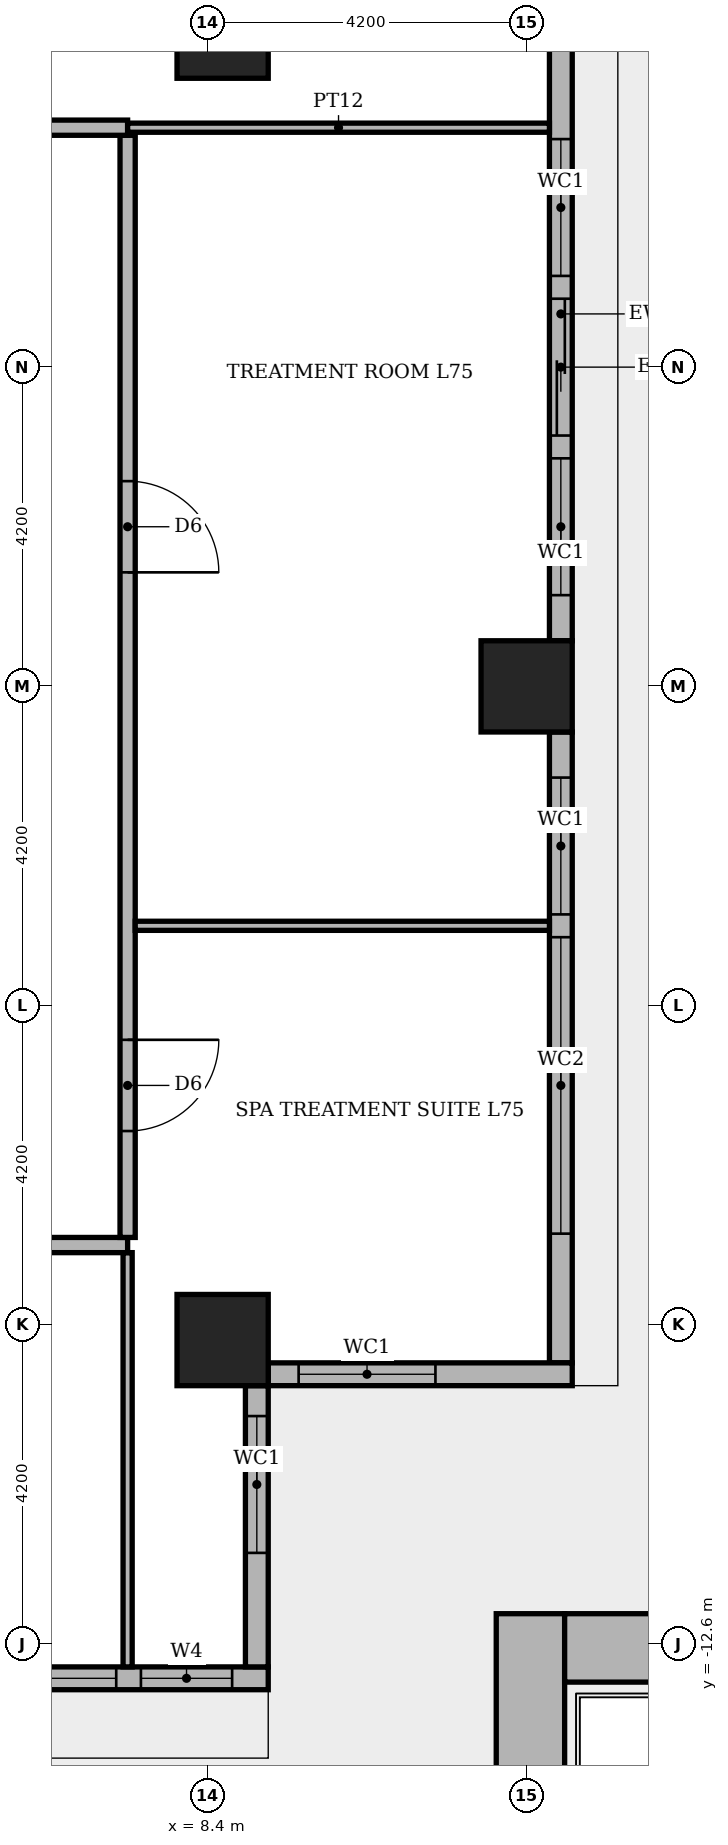
"""IFC4 building model, lengths in metres.
Left out: names, types, materials, properties, quantities, classifications, styles, units other than length and angle.
Written with IfcOpenShell. Run it as: python <this file> out.ifc"""

import sys

from ifc_helpers import new_model, si_unit, direction, frame, frame_2d, origin, origin_2d, place, context, subcontext, project, spatial, rectangle, extrude, element, fill, save


model = new_model("IFC4")
c1 = context("Model", 3, precision=1e-05, world=origin(), true_north=direction((0.0, 1.0)))
c2 = subcontext(c1, "Body", "Model", "MODEL_VIEW")
j1 = project(units=[si_unit("LENGTHUNIT", "METRE"), si_unit("PLANEANGLEUNIT", "RADIAN")], contexts=[c1])
p1 = place(None, origin())
s1 = spatial("IfcSite", under=j1, at=p1, CompositionType="ELEMENT")
p2 = place(p1, origin())
s2 = spatial("IfcBuilding", under=s1, at=p2, CompositionType="ELEMENT")
p3 = place(p2, frame((0.0, 0.0, 312.3)))
s3 = spatial("IfcBuildingStorey", under=s2, at=p3, CompositionType="ELEMENT", Elevation=312.3)
for number, where, z_axis, x_axis in (
    (1, (12.6, 0.0, -0.35), (0.0, 0.0, 1.0), (1.0, 0.0, 0.0)),
    (2, (8.6, 8.6, -0.35), (0.0, 0.0, 1.0), (1.0, 0.0, 0.0)),
    (3, (8.6, -8.6, -0.35), (0.0, 0.0, 1.0), (1.0, 0.0, 0.0)),
):
    element("IfcColumn", number, at=place(p3, frame(where, z_axis=z_axis, x_axis=x_axis)), inside=s3, PredefinedType="COLUMN", context=c2, shape_type="SweptSolid", body=[
        extrude(rectangle(XDim=1.2, YDim=1.2, at=origin_2d()), origin(), (0.0, 0.0, 1.0), 4.25),
    ])
p4 = place(p3, frame((13.05, -8.9, 0.0), z_axis=(0.0, 0.0, 1.0), x_axis=(0.0, 1.0, 0.0)))
e4 = element("IfcWall", 4, at=p4, inside=s3, PredefinedType="STANDARD", context=c2, shape_type="SweptSolid", body=[
    extrude(rectangle(XDim=8.3, YDim=0.3, at=frame_2d((4.15, 0.0))), origin(), (0.0, 0.0, 1.0), 3.55),
])
p5 = place(p4, frame((1.7, 0.0, 0.6)))
e5 = element("IfcOpeningElement", 5, at=p5, cuts=e4, PredefinedType="OPENING", context=c2, shape_type="SweptSolid", body=[
    extrude(rectangle(XDim=3.9, YDim=2.4, at=frame_2d((1.95, 1.2))), frame((0.0, 0.16, 0.0), z_axis=(0.0, -1.0, 0.0), x_axis=(1.0, 0.0, 0.0)), (0.0, 0.0, 1.0), 0.32),
])
p6 = place(p4, frame((5.9, 0.0, 0.6)))
e6 = element("IfcOpeningElement", 6, at=p6, cuts=e4, PredefinedType="OPENING", context=c2, shape_type="SweptSolid", body=[
    extrude(rectangle(XDim=1.8, YDim=2.4, at=frame_2d((0.9, 1.2))), frame((0.0, 0.16, 0.0), z_axis=(0.0, -1.0, 0.0), x_axis=(1.0, 0.0, 0.0)), (0.0, 0.0, 1.0), 0.32),
])
p7 = place(p3, frame((13.05, 0.6, 0.0), z_axis=(0.0, 0.0, 1.0), x_axis=(0.0, 1.0, 0.0)))
e7 = element("IfcWall", 7, at=p7, inside=s3, PredefinedType="STANDARD", context=c2, shape_type="SweptSolid", body=[
    extrude(rectangle(XDim=8.6, YDim=0.3, at=frame_2d((4.3, 0.0))), origin(), (0.0, 0.0, 1.0), 3.55),
])
p8 = place(p7, frame((0.6, 0.0, 0.6)))
e8 = element("IfcOpeningElement", 8, at=p8, cuts=e7, PredefinedType="OPENING", context=c2, shape_type="SweptSolid", body=[
    extrude(rectangle(XDim=1.8, YDim=2.4, at=frame_2d((0.9, 1.2))), frame((0.0, 0.16, 0.0), z_axis=(0.0, -1.0, 0.0), x_axis=(1.0, 0.0, 0.0)), (0.0, 0.0, 1.0), 0.32),
])
p9 = place(p7, frame((2.7, 0.0, 0.0)))
e9 = element("IfcOpeningElement", 9, at=p9, cuts=e7, PredefinedType="OPENING", context=c2, shape_type="SweptSolid", body=[
    extrude(rectangle(XDim=1.8, YDim=2.4, at=frame_2d((0.9, 1.2))), frame((0.0, 0.16, 0.0), z_axis=(0.0, -1.0, 0.0), x_axis=(1.0, 0.0, 0.0)), (0.0, 0.0, 1.0), 0.32),
])
p10 = place(p7, frame((4.8, 0.0, 0.6)))
e10 = element("IfcOpeningElement", 10, at=p10, cuts=e7, PredefinedType="OPENING", context=c2, shape_type="SweptSolid", body=[
    extrude(rectangle(XDim=1.8, YDim=2.4, at=frame_2d((0.9, 1.2))), frame((0.0, 0.16, 0.0), z_axis=(0.0, -1.0, 0.0), x_axis=(1.0, 0.0, 0.0)), (0.0, 0.0, 1.0), 0.32),
])
p11 = place(p3, frame((0.6, -13.05, 0.0), z_axis=(0.0, 0.0, 1.0), x_axis=(1.0, 0.0, 0.0)))
e11 = element("IfcWall", 11, at=p11, inside=s3, PredefinedType="STANDARD", context=c2, shape_type="SweptSolid", body=[
    extrude(rectangle(XDim=8.6, YDim=0.3, at=frame_2d((4.3, 0.0))), origin(), (0.0, 0.0, 1.0), 3.55),
])
p12 = place(p11, frame((0.6, 0.0, 0.6)))
e12 = element("IfcOpeningElement", 12, at=p12, cuts=e11, PredefinedType="OPENING", context=c2, shape_type="SweptSolid", body=[
    extrude(rectangle(XDim=6.0, YDim=2.4, at=frame_2d((3.0, 1.2))), frame((0.0, 0.16, 0.0), z_axis=(0.0, -1.0, 0.0), x_axis=(1.0, 0.0, 0.0)), (0.0, 0.0, 1.0), 0.32),
])
p13 = place(p11, frame((6.925, 0.0, 0.9)))
e13 = element("IfcOpeningElement", 13, at=p13, cuts=e11, PredefinedType="OPENING", context=c2, shape_type="SweptSolid", body=[
    extrude(rectangle(XDim=1.2, YDim=2.1, at=frame_2d((0.6, 1.05))), frame((0.0, 0.16, 0.0), z_axis=(0.0, -1.0, 0.0), x_axis=(1.0, 0.0, 0.0)), (0.0, 0.0, 1.0), 0.32),
])
p14 = place(p3, frame((9.05, -12.9, 0.0), z_axis=(0.0, 0.0, 1.0), x_axis=(0.0, 1.0, 0.0)))
e14 = element("IfcWall", 14, at=p14, inside=s3, PredefinedType="STANDARD", context=c2, shape_type="SweptSolid", body=[
    extrude(rectangle(XDim=3.7, YDim=0.3, at=frame_2d((1.85, 0.0))), origin(), (0.0, 0.0, 1.0), 3.55),
])
p15 = place(p14, frame((1.5, 0.0, 0.6)))
e15 = element("IfcOpeningElement", 15, at=p15, cuts=e14, PredefinedType="OPENING", context=c2, shape_type="SweptSolid", body=[
    extrude(rectangle(XDim=1.8, YDim=2.4, at=frame_2d((0.9, 1.2))), frame((0.0, 0.16, 0.0), z_axis=(0.0, -1.0, 0.0), x_axis=(1.0, 0.0, 0.0)), (0.0, 0.0, 1.0), 0.32),
])
p16 = place(p3, frame((9.2, -9.05, 0.0), z_axis=(0.0, 0.0, 1.0), x_axis=(1.0, 0.0, 0.0)))
e16 = element("IfcWall", 16, at=p16, inside=s3, PredefinedType="STANDARD", context=c2, shape_type="SweptSolid", body=[
    extrude(rectangle(XDim=4.0, YDim=0.3, at=frame_2d((2.0, 0.0))), origin(), (0.0, 0.0, 1.0), 3.55),
])
p17 = place(p16, frame((0.4, 0.0, 0.6)))
e17 = element("IfcOpeningElement", 17, at=p17, cuts=e16, PredefinedType="OPENING", context=c2, shape_type="SweptSolid", body=[
    extrude(rectangle(XDim=1.8, YDim=2.4, at=frame_2d((0.9, 1.2))), frame((0.0, 0.16, 0.0), z_axis=(0.0, -1.0, 0.0), x_axis=(1.0, 0.0, 0.0)), (0.0, 0.0, 1.0), 0.32),
])
p18 = place(p3, frame((12.65, -18.6, 0.0), z_axis=(0.0, 0.0, 1.0), x_axis=(0.0, 1.0, 0.0)))
e18 = element("IfcWall", 18, at=p18, inside=s3, PredefinedType="MOVABLE", context=c2, shape_type="SweptSolid", body=[
    extrude(rectangle(XDim=6.4, YDim=0.9, at=frame_2d((3.2, 0.0))), origin(), (0.0, 0.0, 1.0), 0.6),
])
p19 = place(p3, frame((13.1, -12.65, 0.0), z_axis=(0.0, 0.0, 1.0), x_axis=(1.0, 0.0, 0.0)))
e19 = element("IfcWall", 19, at=p19, inside=s3, PredefinedType="MOVABLE", context=c2, shape_type="SweptSolid", body=[
    extrude(rectangle(XDim=4.6, YDim=0.9, at=frame_2d((2.3, 0.0))), origin(), (0.0, 0.0, 1.0), 0.6),
])
p20 = place(p3, frame((7.35, -12.9, 0.0), z_axis=(0.0, 0.0, 1.0), x_axis=(0.0, 1.0, 0.0)))
e20 = element("IfcWall", 20, at=p20, inside=s3, PredefinedType="PARTITIONING", context=c2, shape_type="SweptSolid", body=[
    extrude(rectangle(XDim=5.45, YDim=0.12, at=frame_2d((2.725, 0.0))), origin(), (0.0, 0.0, 1.0), 3.55),
])
p21 = place(p3, frame((-7.35, -7.35, 0.0), z_axis=(0.0, 0.0, 1.0), x_axis=(1.0, 0.0, 0.0)))
e21 = element("IfcWall", 21, at=p21, inside=s3, PredefinedType="PARTITIONING", context=c2, shape_type="SweptSolid", body=[
    extrude(rectangle(XDim=14.7, YDim=0.2, at=frame_2d((7.35, 0.0))), origin(), (0.0, 0.0, 1.0), 3.55),
])
p22 = place(p21, frame((3.6, 0.0, 0.0)))
e22 = element("IfcOpeningElement", 22, at=p22, cuts=e21, PredefinedType="OPENING", context=c2, shape_type="SweptSolid", body=[
    extrude(rectangle(XDim=1.2, YDim=2.1, at=frame_2d((0.6, 1.05))), frame((0.0, 0.11, 0.0), z_axis=(0.0, -1.0, 0.0), x_axis=(1.0, 0.0, 0.0)), (0.0, 0.0, 1.0), 0.22),
])
p23 = place(p21, frame((10.95, 0.0, 0.0)))
e23 = element("IfcOpeningElement", 23, at=p23, cuts=e21, PredefinedType="OPENING", context=c2, shape_type="SweptSolid", body=[
    extrude(rectangle(XDim=1.2, YDim=2.1, at=frame_2d((0.6, 1.05))), frame((0.0, 0.11, 0.0), z_axis=(0.0, -1.0, 0.0), x_axis=(1.0, 0.0, 0.0)), (0.0, 0.0, 1.0), 0.22),
])
p24 = place(p3, frame((7.35, -7.25, 0.0), z_axis=(0.0, 0.0, 1.0), x_axis=(0.0, 1.0, 0.0)))
e24 = element("IfcWall", 24, at=p24, inside=s3, PredefinedType="PARTITIONING", context=c2, shape_type="SweptSolid", body=[
    extrude(rectangle(XDim=14.5, YDim=0.2, at=frame_2d((7.25, 0.0))), origin(), (0.0, 0.0, 1.0), 3.55),
])
p25 = place(p24, frame((1.4, 0.0, 0.0)))
e25 = element("IfcOpeningElement", 25, at=p25, cuts=e24, PredefinedType="OPENING", context=c2, shape_type="SweptSolid", body=[
    extrude(rectangle(XDim=1.2, YDim=2.1, at=frame_2d((0.6, 1.05))), frame((0.0, 0.11, 0.0), z_axis=(0.0, -1.0, 0.0), x_axis=(1.0, 0.0, 0.0)), (0.0, 0.0, 1.0), 0.22),
])
p26 = place(p24, frame((8.75, 0.0, 0.0)))
e26 = element("IfcOpeningElement", 26, at=p26, cuts=e24, PredefinedType="OPENING", context=c2, shape_type="SweptSolid", body=[
    extrude(rectangle(XDim=1.2, YDim=2.1, at=frame_2d((0.6, 1.05))), frame((0.0, 0.11, 0.0), z_axis=(0.0, -1.0, 0.0), x_axis=(1.0, 0.0, 0.0)), (0.0, 0.0, 1.0), 0.22),
])
p27 = place(p3, frame((7.45, -3.15, 0.0), z_axis=(0.0, 0.0, 1.0), x_axis=(1.0, 0.0, 0.0)))
e27 = element("IfcWall", 27, at=p27, inside=s3, PredefinedType="PARTITIONING", context=c2, shape_type="SweptSolid", body=[
    extrude(rectangle(XDim=5.45, YDim=0.12, at=frame_2d((2.725, 0.0))), origin(), (0.0, 0.0, 1.0), 3.55),
])
p28 = place(p3, frame((1.3, 7.35, 0.0), z_axis=(0.0, 0.0, 1.0), x_axis=(1.0, 0.0, 0.0)))
e28 = element("IfcWall", 28, at=p28, inside=s3, PredefinedType="PARTITIONING", context=c2, shape_type="SweptSolid", body=[
    extrude(rectangle(XDim=6.05, YDim=0.2, at=frame_2d((3.025, 0.0))), origin(), (0.0, 0.0, 1.0), 3.55),
])
p29 = place(p28, frame((2.425, 0.0, 0.0)))
e29 = element("IfcOpeningElement", 29, at=p29, cuts=e28, PredefinedType="OPENING", context=c2, shape_type="SweptSolid", body=[
    extrude(rectangle(XDim=1.2, YDim=2.1, at=frame_2d((0.6, 1.05))), frame((0.0, 0.11, 0.0), z_axis=(0.0, -1.0, 0.0), x_axis=(1.0, 0.0, 0.0)), (0.0, 0.0, 1.0), 0.22),
])
p30 = place(p3, frame((7.35, 7.35, 0.0), z_axis=(0.0, 0.0, 1.0), x_axis=(1.0, 0.0, 0.0)))
e30 = element("IfcWall", 30, at=p30, inside=s3, PredefinedType="PARTITIONING", context=c2, shape_type="SweptSolid", body=[
    extrude(rectangle(XDim=5.55, YDim=0.12, at=frame_2d((2.775, 0.0))), origin(), (0.0, 0.0, 1.0), 3.55),
])
p31 = place(p5, origin())
e31 = element("IfcWindow", 31, at=p31, inside=s3, PartitioningType="SINGLE_PANEL", PredefinedType="WINDOW", context=c2, shape_type="SweptSolid", body=[
    extrude(rectangle(XDim=3.9, YDim=2.4, at=frame_2d((1.95, 1.2))), frame((0.0, 0.03, 0.0), z_axis=(0.0, -1.0, 0.0), x_axis=(1.0, 0.0, 0.0)), (0.0, 0.0, 1.0), 0.06),
])
fill(e5, e31)
p32 = place(p6, origin())
e32 = element("IfcWindow", 32, at=p32, inside=s3, PartitioningType="SINGLE_PANEL", PredefinedType="WINDOW", context=c2, shape_type="SweptSolid", body=[
    extrude(rectangle(XDim=1.8, YDim=2.4, at=frame_2d((0.9, 1.2))), frame((0.0, 0.03, 0.0), z_axis=(0.0, -1.0, 0.0), x_axis=(1.0, 0.0, 0.0)), (0.0, 0.0, 1.0), 0.06),
])
fill(e6, e32)
p33 = place(p8, origin())
e33 = element("IfcWindow", 33, at=p33, inside=s3, PartitioningType="SINGLE_PANEL", PredefinedType="WINDOW", context=c2, shape_type="SweptSolid", body=[
    extrude(rectangle(XDim=1.8, YDim=2.4, at=frame_2d((0.9, 1.2))), frame((0.0, 0.03, 0.0), z_axis=(0.0, -1.0, 0.0), x_axis=(1.0, 0.0, 0.0)), (0.0, 0.0, 1.0), 0.06),
])
fill(e8, e33)
p34 = place(p9, origin())
e34 = element("IfcDoor", 34, at=p34, inside=s3, OperationType="SLIDING_TO_LEFT", PredefinedType="DOOR", context=c2, shape_type="SweptSolid", body=[
    extrude(rectangle(XDim=1.8, YDim=2.4, at=frame_2d((0.9, 1.2))), frame((0.0, 0.025, 0.0), z_axis=(0.0, -1.0, 0.0), x_axis=(1.0, 0.0, 0.0)), (0.0, 0.0, 1.0), 0.05),
])
fill(e9, e34)
p35 = place(p10, origin())
e35 = element("IfcWindow", 35, at=p35, inside=s3, PartitioningType="SINGLE_PANEL", PredefinedType="WINDOW", context=c2, shape_type="SweptSolid", body=[
    extrude(rectangle(XDim=1.8, YDim=2.4, at=frame_2d((0.9, 1.2))), frame((0.0, 0.03, 0.0), z_axis=(0.0, -1.0, 0.0), x_axis=(1.0, 0.0, 0.0)), (0.0, 0.0, 1.0), 0.06),
])
fill(e10, e35)
p36 = place(p12, origin())
e36 = element("IfcWindow", 36, at=p36, inside=s3, PartitioningType="SINGLE_PANEL", PredefinedType="WINDOW", context=c2, shape_type="SweptSolid", body=[
    extrude(rectangle(XDim=6.0, YDim=2.4, at=frame_2d((3.0, 1.2))), frame((0.0, 0.03, 0.0), z_axis=(0.0, -1.0, 0.0), x_axis=(1.0, 0.0, 0.0)), (0.0, 0.0, 1.0), 0.06),
])
fill(e12, e36)
p37 = place(p13, origin())
e37 = element("IfcWindow", 37, at=p37, inside=s3, PartitioningType="SINGLE_PANEL", PredefinedType="WINDOW", context=c2, shape_type="SweptSolid", body=[
    extrude(rectangle(XDim=1.2, YDim=2.1, at=frame_2d((0.6, 1.05))), frame((0.0, 0.03, 0.0), z_axis=(0.0, -1.0, 0.0), x_axis=(1.0, 0.0, 0.0)), (0.0, 0.0, 1.0), 0.06),
])
fill(e13, e37)
p38 = place(p15, origin())
e38 = element("IfcWindow", 38, at=p38, inside=s3, PartitioningType="SINGLE_PANEL", PredefinedType="WINDOW", context=c2, shape_type="SweptSolid", body=[
    extrude(rectangle(XDim=1.8, YDim=2.4, at=frame_2d((0.9, 1.2))), frame((0.0, 0.03, 0.0), z_axis=(0.0, -1.0, 0.0), x_axis=(1.0, 0.0, 0.0)), (0.0, 0.0, 1.0), 0.06),
])
fill(e15, e38)
p39 = place(p17, origin())
e39 = element("IfcWindow", 39, at=p39, inside=s3, PartitioningType="SINGLE_PANEL", PredefinedType="WINDOW", context=c2, shape_type="SweptSolid", body=[
    extrude(rectangle(XDim=1.8, YDim=2.4, at=frame_2d((0.9, 1.2))), frame((0.0, 0.03, 0.0), z_axis=(0.0, -1.0, 0.0), x_axis=(1.0, 0.0, 0.0)), (0.0, 0.0, 1.0), 0.06),
])
fill(e17, e39)
p40 = place(p25, frame((1.2, 0.0, 0.0), z_axis=(0.0, 0.0, 1.0), x_axis=(-1.0, 0.0, 0.0)))
e40 = element("IfcDoor", 40, at=p40, inside=s3, OperationType="SINGLE_SWING_RIGHT", PredefinedType="DOOR", context=c2, shape_type="SweptSolid", body=[
    extrude(rectangle(XDim=1.2, YDim=2.1, at=frame_2d((0.6, 1.05))), frame((0.0, 0.025, 0.0), z_axis=(0.0, -1.0, 0.0), x_axis=(1.0, 0.0, 0.0)), (0.0, 0.0, 1.0), 0.05),
])
fill(e25, e40)
p41 = place(p26, frame((1.2, 0.0, 0.0), z_axis=(0.0, 0.0, 1.0), x_axis=(-1.0, 0.0, 0.0)))
e41 = element("IfcDoor", 41, at=p41, inside=s3, OperationType="SINGLE_SWING_LEFT", PredefinedType="DOOR", context=c2, shape_type="SweptSolid", body=[
    extrude(rectangle(XDim=1.2, YDim=2.1, at=frame_2d((0.6, 1.05))), frame((0.0, 0.025, 0.0), z_axis=(0.0, -1.0, 0.0), x_axis=(1.0, 0.0, 0.0)), (0.0, 0.0, 1.0), 0.05),
])
fill(e26, e41)
save(model, sys.argv[1])
